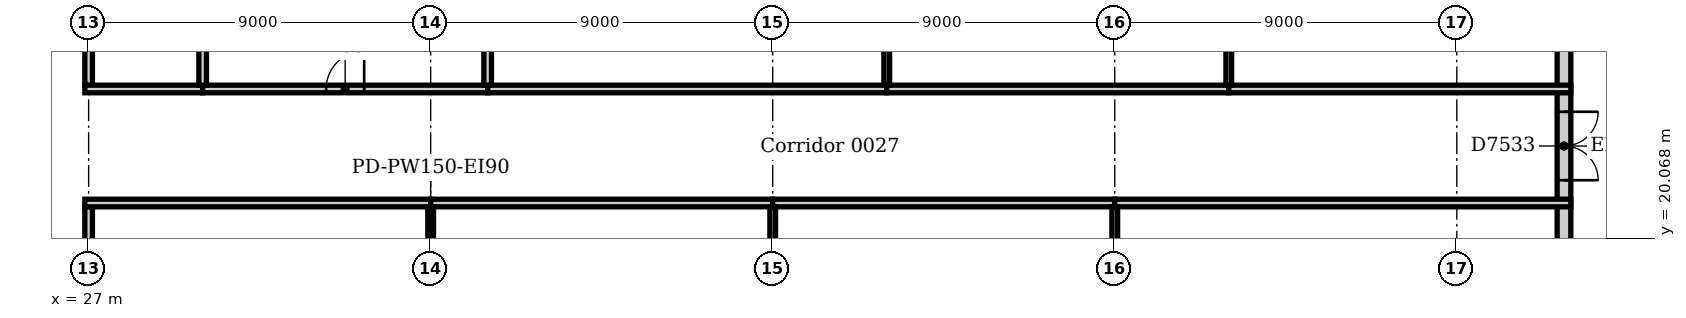
"""IFC4 building model, lengths in metres.
Left out: names, types, materials, properties, quantities, classifications, styles, units other than length and angle.
Written with IfcOpenShell. Run it as: python <this file> out.ifc"""

import sys

from ifc_helpers import new_model, si_unit, direction, frame, frame_2d, origin, place, context, subcontext, project, spatial, rectangle, extrude, element, fill, save


model = new_model("IFC4")
c1 = context("Model", 3, precision=1e-05, world=origin(), true_north=direction((0.0, 1.0)))
c2 = subcontext(c1, "Body", "Model", "MODEL_VIEW")
j1 = project(units=[si_unit("LENGTHUNIT", "METRE"), si_unit("PLANEANGLEUNIT", "RADIAN")], contexts=[c1])
p1 = place(None, origin())
s1 = spatial("IfcSite", under=j1, at=p1, CompositionType="ELEMENT")
p2 = place(p1, origin())
s2 = spatial("IfcBuilding", under=s1, at=p2, CompositionType="ELEMENT")
p3 = place(p2, origin())
s3 = spatial("IfcBuildingStorey", under=s2, at=p3, CompositionType="ELEMENT", Elevation=0.0)
p4 = place(p3, frame((65.82, -9.0, 0.0), z_axis=(0.0, 0.0, 1.0), x_axis=(0.0, 1.0, 0.0)))
e1 = element("IfcWall", 1, at=p4, inside=s3, PredefinedType="STANDARD", context=c2, shape_type="SweptSolid", body=[
    extrude(rectangle(XDim=63.0, YDim=0.36, at=frame_2d((31.5, 0.0))), origin(), (0.0, 0.0, 1.0), 5.7),
])
p5 = place(p4, frame((30.6, 0.0, 0.0)))
e2 = element("IfcOpeningElement", 2, at=p5, cuts=e1, PredefinedType="OPENING", context=c2, shape_type="SweptSolid", body=[
    extrude(rectangle(XDim=1.8, YDim=2.2, at=frame_2d((0.9, 1.1))), frame((0.0, 0.19, 0.0), z_axis=(0.0, -1.0, 0.0), x_axis=(1.0, 0.0, 0.0)), (0.0, 0.0, 1.0), 0.38),
])
p6 = place(p4, frame((51.6, 0.0, 0.0)))
e3 = element("IfcOpeningElement", 3, at=p6, cuts=e1, PredefinedType="OPENING", context=c2, shape_type="SweptSolid", body=[
    extrude(rectangle(XDim=1.8, YDim=2.2, at=frame_2d((0.9, 1.1))), frame((0.0, 0.19, 0.0), z_axis=(0.0, -1.0, 0.0), x_axis=(1.0, 0.0, 0.0)), (0.0, 0.0, 1.0), 0.38),
])
p7 = place(p4, frame((9.6, 0.0, 0.0)))
e4 = element("IfcOpeningElement", 4, at=p7, cuts=e1, PredefinedType="OPENING", context=c2, shape_type="SweptSolid", body=[
    extrude(rectangle(XDim=2.4, YDim=2.2, at=frame_2d((1.2, 1.1))), frame((0.0, 0.19, 0.0), z_axis=(0.0, -1.0, 0.0), x_axis=(1.0, 0.0, 0.0)), (0.0, 0.0, 1.0), 0.38),
])
p8 = place(p4, frame((2.85, 0.0, 0.6)))
e5 = element("IfcOpeningElement", 5, at=p8, cuts=e1, PredefinedType="OPENING", context=c2, shape_type="SweptSolid", body=[
    extrude(rectangle(XDim=3.3, YDim=3.0, at=frame_2d((1.65, 1.5))), frame((0.0, 0.19, 0.0), z_axis=(0.0, -1.0, 0.0), x_axis=(1.0, 0.0, 0.0)), (0.0, 0.0, 1.0), 0.38),
])
p9 = place(p4, frame((16.35, 0.0, 0.6)))
e6 = element("IfcOpeningElement", 6, at=p9, cuts=e1, PredefinedType="OPENING", context=c2, shape_type="SweptSolid", body=[
    extrude(rectangle(XDim=3.3, YDim=3.0, at=frame_2d((1.65, 1.5))), frame((0.0, 0.19, 0.0), z_axis=(0.0, -1.0, 0.0), x_axis=(1.0, 0.0, 0.0)), (0.0, 0.0, 1.0), 0.38),
])
p10 = place(p4, frame((20.85, 0.0, 0.6)))
e7 = element("IfcOpeningElement", 7, at=p10, cuts=e1, PredefinedType="OPENING", context=c2, shape_type="SweptSolid", body=[
    extrude(rectangle(XDim=3.3, YDim=3.0, at=frame_2d((1.65, 1.5))), frame((0.0, 0.19, 0.0), z_axis=(0.0, -1.0, 0.0), x_axis=(1.0, 0.0, 0.0)), (0.0, 0.0, 1.0), 0.38),
])
p11 = place(p4, frame((25.35, 0.0, 0.6)))
e8 = element("IfcOpeningElement", 8, at=p11, cuts=e1, PredefinedType="OPENING", context=c2, shape_type="SweptSolid", body=[
    extrude(rectangle(XDim=3.3, YDim=3.0, at=frame_2d((1.65, 1.5))), frame((0.0, 0.19, 0.0), z_axis=(0.0, -1.0, 0.0), x_axis=(1.0, 0.0, 0.0)), (0.0, 0.0, 1.0), 0.38),
])
p12 = place(p4, frame((34.35, 0.0, 0.6)))
e9 = element("IfcOpeningElement", 9, at=p12, cuts=e1, PredefinedType="OPENING", context=c2, shape_type="SweptSolid", body=[
    extrude(rectangle(XDim=3.3, YDim=3.0, at=frame_2d((1.65, 1.5))), frame((0.0, 0.19, 0.0), z_axis=(0.0, -1.0, 0.0), x_axis=(1.0, 0.0, 0.0)), (0.0, 0.0, 1.0), 0.38),
])
p13 = place(p4, frame((38.85, 0.0, 0.6)))
e10 = element("IfcOpeningElement", 10, at=p13, cuts=e1, PredefinedType="OPENING", context=c2, shape_type="SweptSolid", body=[
    extrude(rectangle(XDim=3.3, YDim=3.0, at=frame_2d((1.65, 1.5))), frame((0.0, 0.19, 0.0), z_axis=(0.0, -1.0, 0.0), x_axis=(1.0, 0.0, 0.0)), (0.0, 0.0, 1.0), 0.38),
])
p14 = place(p4, frame((43.35, 0.0, 0.6)))
e11 = element("IfcOpeningElement", 11, at=p14, cuts=e1, PredefinedType="OPENING", context=c2, shape_type="SweptSolid", body=[
    extrude(rectangle(XDim=3.3, YDim=3.0, at=frame_2d((1.65, 1.5))), frame((0.0, 0.19, 0.0), z_axis=(0.0, -1.0, 0.0), x_axis=(1.0, 0.0, 0.0)), (0.0, 0.0, 1.0), 0.38),
])
p15 = place(p4, frame((47.85, 0.0, 0.6)))
e12 = element("IfcOpeningElement", 12, at=p15, cuts=e1, PredefinedType="OPENING", context=c2, shape_type="SweptSolid", body=[
    extrude(rectangle(XDim=3.3, YDim=3.0, at=frame_2d((1.65, 1.5))), frame((0.0, 0.19, 0.0), z_axis=(0.0, -1.0, 0.0), x_axis=(1.0, 0.0, 0.0)), (0.0, 0.0, 1.0), 0.38),
])
p16 = place(p4, frame((56.85, 0.0, 0.6)))
e13 = element("IfcOpeningElement", 13, at=p16, cuts=e1, PredefinedType="OPENING", context=c2, shape_type="SweptSolid", body=[
    extrude(rectangle(XDim=3.3, YDim=3.0, at=frame_2d((1.65, 1.5))), frame((0.0, 0.19, 0.0), z_axis=(0.0, -1.0, 0.0), x_axis=(1.0, 0.0, 0.0)), (0.0, 0.0, 1.0), 0.38),
])
for number, where, z_axis, x_axis in (
    (14, (27.0, 18.52, 0.0), (0.0, 0.0, 1.0), (0.0, 1.0, 0.0)),
    (15, (27.0, 24.1, 0.0), (0.0, 0.0, 1.0), (0.0, 1.0, 0.0)),
):
    element("IfcWall", number, at=place(p3, frame(where, z_axis=z_axis, x_axis=x_axis)), inside=s3, PredefinedType="PARTITIONING", context=c2, shape_type="SweptSolid", body=[
        extrude(rectangle(XDim=2.38, YDim=0.2, at=frame_2d((1.19, 0.0))), origin(), (0.0, 0.0, 1.0), 5.7),
    ])
p17 = place(p3, frame((26.9, 21.0, 0.0), z_axis=(0.0, 0.0, 1.0), x_axis=(1.0, 0.0, 0.0)))
e16 = element("IfcWall", 16, at=p17, inside=s3, PredefinedType="PARTITIONING", context=c2, shape_type="SweptSolid", body=[
    extrude(rectangle(XDim=9.1, YDim=0.2, at=frame_2d((4.55, 0.0))), origin(), (0.0, 0.0, 1.0), 5.7),
])
for number, where, z_axis, x_axis in (
    (17, (36.0, 21.0, 0.0), (0.0, 0.0, 1.0), (1.0, 0.0, 0.0)),
    (18, (45.0, 21.0, 0.0), (0.0, 0.0, 1.0), (1.0, 0.0, 0.0)),
):
    element("IfcWall", number, at=place(p3, frame(where, z_axis=z_axis, x_axis=x_axis)), inside=s3, PredefinedType="PARTITIONING", context=c2, shape_type="SweptSolid", body=[
        extrude(rectangle(XDim=9.0, YDim=0.2, at=frame_2d((4.5, 0.0))), origin(), (0.0, 0.0, 1.0), 5.7),
    ])
p18 = place(p3, frame((54.0, 21.0, 0.0), z_axis=(0.0, 0.0, 1.0), x_axis=(1.0, 0.0, 0.0)))
e19 = element("IfcWall", 19, at=p18, inside=s3, PredefinedType="PARTITIONING", context=c2, shape_type="SweptSolid", body=[
    extrude(rectangle(XDim=12.0, YDim=0.2, at=frame_2d((6.0, 0.0))), origin(), (0.0, 0.0, 1.0), 5.7),
])
p19 = place(p3, frame((26.9, 24.0, 0.0), z_axis=(0.0, 0.0, 1.0), x_axis=(1.0, 0.0, 0.0)))
e20 = element("IfcWall", 20, at=p19, inside=s3, PredefinedType="PARTITIONING", context=c2, shape_type="SweptSolid", body=[
    extrude(rectangle(XDim=3.1, YDim=0.2, at=frame_2d((1.55, 0.0))), origin(), (0.0, 0.0, 1.0), 5.7),
])
p20 = place(p3, frame((30.0, 24.0, 0.0), z_axis=(0.0, 0.0, 1.0), x_axis=(1.0, 0.0, 0.0)))
e21 = element("IfcWall", 21, at=p20, inside=s3, PredefinedType="PARTITIONING", context=c2, shape_type="SweptSolid", body=[
    extrude(rectangle(XDim=7.5, YDim=0.2, at=frame_2d((3.75, 0.0))), origin(), (0.0, 0.0, 1.0), 5.7),
])
p21 = place(p20, frame((3.25, 0.0, 0.0)))
e22 = element("IfcOpeningElement", 22, at=p21, cuts=e21, PredefinedType="OPENING", context=c2, shape_type="SweptSolid", body=[
    extrude(rectangle(XDim=1.0, YDim=2.1, at=frame_2d((0.5, 1.05))), frame((0.0, 0.11, 0.0), z_axis=(0.0, -1.0, 0.0), x_axis=(1.0, 0.0, 0.0)), (0.0, 0.0, 1.0), 0.22),
])
p22 = place(p3, frame((37.5, 24.0, 0.0), z_axis=(0.0, 0.0, 1.0), x_axis=(1.0, 0.0, 0.0)))
e23 = element("IfcWall", 23, at=p22, inside=s3, PredefinedType="PARTITIONING", context=c2, shape_type="SweptSolid", body=[
    extrude(rectangle(XDim=10.5, YDim=0.2, at=frame_2d((5.25, 0.0))), origin(), (0.0, 0.0, 1.0), 5.7),
])
for number, where, z_axis, x_axis in (
    (24, (48.0, 24.0, 0.0), (0.0, 0.0, 1.0), (1.0, 0.0, 0.0)),
    (25, (57.0, 24.0, 0.0), (0.0, 0.0, 1.0), (1.0, 0.0, 0.0)),
):
    element("IfcWall", number, at=place(p3, frame(where, z_axis=z_axis, x_axis=x_axis)), inside=s3, PredefinedType="PARTITIONING", context=c2, shape_type="SweptSolid", body=[
        extrude(rectangle(XDim=9.0, YDim=0.2, at=frame_2d((4.5, 0.0))), origin(), (0.0, 0.0, 1.0), 5.7),
    ])
for number, where, z_axis, x_axis in (
    (26, (36.0, 18.52, 0.0), (0.0, 0.0, 1.0), (0.0, 1.0, 0.0)),
    (27, (45.0, 18.52, 0.0), (0.0, 0.0, 1.0), (0.0, 1.0, 0.0)),
    (28, (54.0, 18.52, 0.0), (0.0, 0.0, 1.0), (0.0, 1.0, 0.0)),
):
    element("IfcWall", number, at=place(p3, frame(where, z_axis=z_axis, x_axis=x_axis)), inside=s3, PredefinedType="PARTITIONING", context=c2, shape_type="SweptSolid", body=[
        extrude(rectangle(XDim=2.38, YDim=0.15, at=frame_2d((1.19, 0.0))), origin(), (0.0, 0.0, 1.0), 5.7),
    ])
for number, where, z_axis, x_axis in (
    (29, (30.0, 24.1, 0.0), (0.0, 0.0, 1.0), (0.0, 1.0, 0.0)),
    (30, (37.5, 24.1, 0.0), (0.0, 0.0, 1.0), (0.0, 1.0, 0.0)),
):
    element("IfcWall", number, at=place(p3, frame(where, z_axis=z_axis, x_axis=x_axis)), inside=s3, PredefinedType="PARTITIONING", context=c2, shape_type="SweptSolid", body=[
        extrude(rectangle(XDim=5.15, YDim=0.2, at=frame_2d((2.575, 0.0))), origin(), (0.0, 0.0, 1.0), 5.7),
    ])
p23 = place(p3, frame((48.0, 24.1, 0.0), z_axis=(0.0, 0.0, 1.0), x_axis=(0.0, 1.0, 0.0)))
e31 = element("IfcWall", 31, at=p23, inside=s3, PredefinedType="PARTITIONING", context=c2, shape_type="SweptSolid", body=[
    extrude(rectangle(XDim=17.8, YDim=0.15, at=frame_2d((8.9, 0.0))), origin(), (0.0, 0.0, 1.0), 5.7),
])
p24 = place(p3, frame((57.0, 24.1, 0.0), z_axis=(0.0, 0.0, 1.0), x_axis=(0.0, 1.0, 0.0)))
e32 = element("IfcWall", 32, at=p24, inside=s3, PredefinedType="PARTITIONING", context=c2, shape_type="SweptSolid", body=[
    extrude(rectangle(XDim=10.678, YDim=0.15, at=frame_2d((5.339, 0.0))), origin(), (0.0, 0.0, 1.0), 5.7),
])
p25 = place(p5, frame((1.8, 0.0, 0.0), z_axis=(0.0, 0.0, 1.0), x_axis=(-1.0, 0.0, 0.0)))
e33 = element("IfcDoor", 33, at=p25, inside=s3, OperationType="DOUBLE_DOOR_SINGLE_SWING", PredefinedType="DOOR", context=c2, shape_type="SweptSolid", body=[
    extrude(rectangle(XDim=1.8, YDim=2.2, at=frame_2d((0.9, 1.1))), frame((0.0, -0.07, 0.0), z_axis=(0.0, -1.0, 0.0), x_axis=(1.0, 0.0, 0.0)), (0.0, 0.0, 1.0), 0.05),
])
fill(e2, e33)
p26 = place(p21, origin())
e34 = element("IfcDoor", 34, at=p26, inside=s3, OperationType="SINGLE_SWING_RIGHT", PredefinedType="DOOR", context=c2, shape_type="SweptSolid", body=[
    extrude(rectangle(XDim=1.0, YDim=2.1, at=frame_2d((0.5, 1.05))), frame((0.0, 0.025, 0.0), z_axis=(0.0, -1.0, 0.0), x_axis=(1.0, 0.0, 0.0)), (0.0, 0.0, 1.0), 0.05),
])
fill(e22, e34)
save(model, sys.argv[1])
